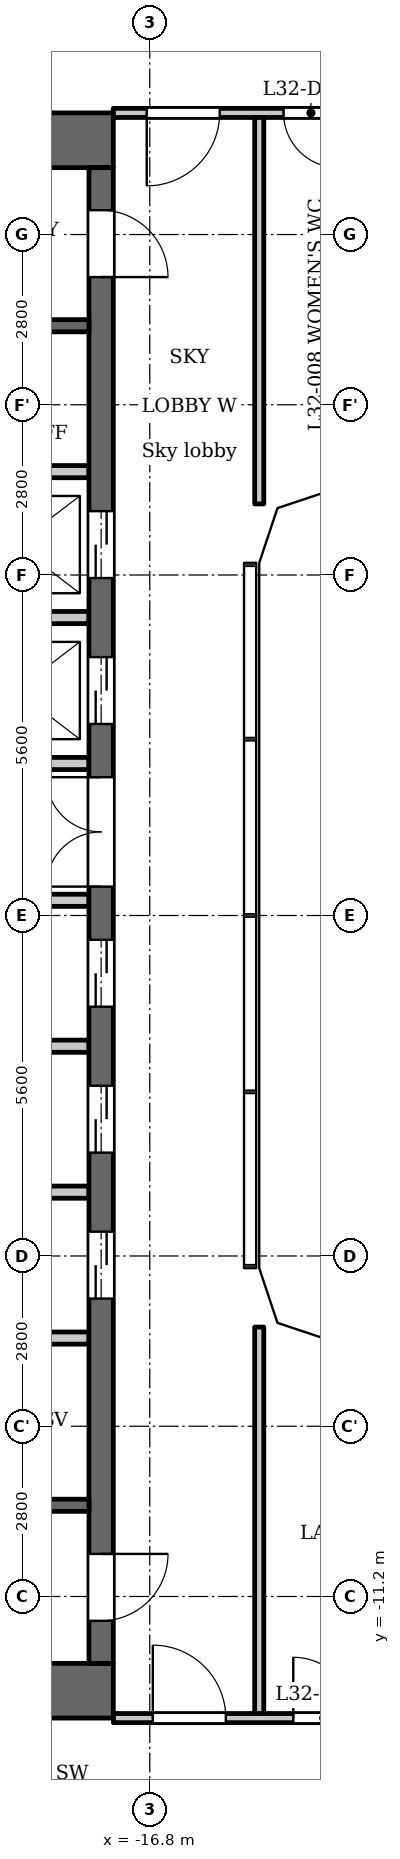
"""IFC4 building model, lengths in metres.
Left out: names, types, materials, properties, quantities, classifications, styles, units other than length and angle.
Written with IfcOpenShell. Run it as: python <this file> out.ifc"""

import sys

from ifc_helpers import new_model, si_unit, direction, frame, frame_2d, origin, place, context, subcontext, project, spatial, polyline, rectangle, outline, extrude, element, fill, save


model = new_model("IFC4")
c1 = context("Model", 3, precision=1e-05, world=origin(), true_north=direction((0.0, 1.0)))
c2 = subcontext(c1, "Body", "Model", "MODEL_VIEW")
j1 = project(units=[si_unit("LENGTHUNIT", "METRE"), si_unit("PLANEANGLEUNIT", "RADIAN")], contexts=[c1])
p1 = place(None, origin())
s1 = spatial("IfcSite", under=j1, at=p1, CompositionType="ELEMENT")
p2 = place(p1, origin())
s2 = spatial("IfcBuilding", under=s1, at=p2, CompositionType="ELEMENT")
p3 = place(p2, frame((0.0, 0.0, 125.3)))
s3 = spatial("IfcBuildingStorey", under=s2, at=p3, CompositionType="ELEMENT", Elevation=125.3)
for number, where, z_axis, x_axis in (
    (1, (-17.4, 12.75, 0.0), (0.0, 0.0, 1.0), (-1.0, 0.0, 0.0)),
    (2, (-17.4, -12.75, 0.0), (0.0, 0.0, 1.0), (-1.0, 0.0, 0.0)),
):
    element("IfcWall", number, at=place(p3, frame(where, z_axis=z_axis, x_axis=x_axis)), inside=s3, PredefinedType="SHEAR", context=c2, shape_type="SweptSolid", body=[
        extrude(rectangle(XDim=10.4, YDim=0.9, at=frame_2d((5.2, 0.0))), origin(), (0.0, 0.0, 1.0), 4.95),
    ])
p4 = place(p3, frame((-17.6, -12.3, 0.0), z_axis=(0.0, 0.0, 1.0), x_axis=(0.0, 1.0, 0.0)))
e3 = element("IfcWall", 3, at=p4, inside=s3, PredefinedType="SHEAR", context=c2, shape_type="SweptSolid", body=[
    extrude(rectangle(XDim=24.6, YDim=0.4, at=frame_2d((12.3, 0.0))), origin(), (0.0, 0.0, 1.0), 4.95),
])
p5 = place(p4, frame((6.0, 0.0, 0.0)))
e4 = element("IfcOpeningElement", 4, at=p5, cuts=e3, PredefinedType="OPENING", context=c2, shape_type="SweptSolid", body=[
    extrude(rectangle(XDim=1.1, YDim=2.1, at=frame_2d((0.55, 1.05))), frame((0.0, 0.21, 0.0), z_axis=(0.0, -1.0, 0.0), x_axis=(1.0, 0.0, 0.0)), (0.0, 0.0, 1.0), 0.42),
])
p6 = place(p4, frame((8.4, 0.0, 0.0)))
e5 = element("IfcOpeningElement", 5, at=p6, cuts=e3, PredefinedType="OPENING", context=c2, shape_type="SweptSolid", body=[
    extrude(rectangle(XDim=1.1, YDim=2.1, at=frame_2d((0.55, 1.05))), frame((0.0, 0.21, 0.0), z_axis=(0.0, -1.0, 0.0), x_axis=(1.0, 0.0, 0.0)), (0.0, 0.0, 1.0), 0.42),
])
p7 = place(p4, frame((10.8, 0.0, 0.0)))
e6 = element("IfcOpeningElement", 6, at=p7, cuts=e3, PredefinedType="OPENING", context=c2, shape_type="SweptSolid", body=[
    extrude(rectangle(XDim=1.1, YDim=2.1, at=frame_2d((0.55, 1.05))), frame((0.0, 0.21, 0.0), z_axis=(0.0, -1.0, 0.0), x_axis=(1.0, 0.0, 0.0)), (0.0, 0.0, 1.0), 0.42),
])
p8 = place(p4, frame((15.45, 0.0, 0.0)))
e7 = element("IfcOpeningElement", 7, at=p8, cuts=e3, PredefinedType="OPENING", context=c2, shape_type="SweptSolid", body=[
    extrude(rectangle(XDim=1.1, YDim=2.1, at=frame_2d((0.55, 1.05))), frame((0.0, 0.21, 0.0), z_axis=(0.0, -1.0, 0.0), x_axis=(1.0, 0.0, 0.0)), (0.0, 0.0, 1.0), 0.42),
])
p9 = place(p4, frame((17.85, 0.0, 0.0)))
e8 = element("IfcOpeningElement", 8, at=p9, cuts=e3, PredefinedType="OPENING", context=c2, shape_type="SweptSolid", body=[
    extrude(rectangle(XDim=1.1, YDim=2.1, at=frame_2d((0.55, 1.05))), frame((0.0, 0.21, 0.0), z_axis=(0.0, -1.0, 0.0), x_axis=(1.0, 0.0, 0.0)), (0.0, 0.0, 1.0), 0.42),
])
p10 = place(p4, frame((22.8, 0.0, 0.0)))
e9 = element("IfcOpeningElement", 9, at=p10, cuts=e3, PredefinedType="OPENING", context=c2, shape_type="SweptSolid", body=[
    extrude(rectangle(XDim=1.1, YDim=2.1, at=frame_2d((0.55, 1.05))), frame((0.0, 0.21, 0.0), z_axis=(0.0, -1.0, 0.0), x_axis=(1.0, 0.0, 0.0)), (0.0, 0.0, 1.0), 0.42),
])
p11 = place(p4, frame((0.7, 0.0, 0.0)))
e10 = element("IfcOpeningElement", 10, at=p11, cuts=e3, PredefinedType="OPENING", context=c2, shape_type="SweptSolid", body=[
    extrude(rectangle(XDim=1.1, YDim=2.1, at=frame_2d((0.55, 1.05))), frame((0.0, 0.21, 0.0), z_axis=(0.0, -1.0, 0.0), x_axis=(1.0, 0.0, 0.0)), (0.0, 0.0, 1.0), 0.42),
])
p12 = place(p4, frame((12.775, 0.0, 0.0)))
e11 = element("IfcOpeningElement", 11, at=p12, cuts=e3, PredefinedType="OPENING", context=c2, shape_type="SweptSolid", body=[
    extrude(rectangle(XDim=1.8, YDim=2.1, at=frame_2d((0.9, 1.05))), frame((0.0, 0.21, 0.0), z_axis=(0.0, -1.0, 0.0), x_axis=(1.0, 0.0, 0.0)), (0.0, 0.0, 1.0), 0.42),
])
p13 = place(p3, frame((-17.8, -9.7, 0.0), z_axis=(0.0, 0.0, 1.0), x_axis=(-1.0, 0.0, 0.0)))
e12 = element("IfcWall", 12, at=p13, inside=s3, PredefinedType="SHEAR", context=c2, shape_type="SweptSolid", body=[
    extrude(rectangle(XDim=8.3, YDim=0.2, at=frame_2d((4.15, 0.0))), origin(), (0.0, 0.0, 1.0), 4.95),
])
p14 = place(p13, frame((0.85, 0.0, 0.0)))
e13 = element("IfcOpeningElement", 13, at=p14, cuts=e12, PredefinedType="OPENING", context=c2, shape_type="SweptSolid", body=[
    extrude(rectangle(XDim=1.1, YDim=2.1, at=frame_2d((0.55, 1.05))), frame((0.0, 0.11, 0.0), z_axis=(0.0, -1.0, 0.0), x_axis=(1.0, 0.0, 0.0)), (0.0, 0.0, 1.0), 0.22),
])
p15 = place(p13, frame((3.75, 0.0, 0.0)))
e14 = element("IfcOpeningElement", 14, at=p15, cuts=e12, PredefinedType="OPENING", context=c2, shape_type="SweptSolid", body=[
    extrude(rectangle(XDim=1.1, YDim=2.1, at=frame_2d((0.55, 1.05))), frame((0.0, 0.11, 0.0), z_axis=(0.0, -1.0, 0.0), x_axis=(1.0, 0.0, 0.0)), (0.0, 0.0, 1.0), 0.22),
])
for number, where, z_axis, x_axis in (
    (15, (-17.8, -6.95, 0.0), (0.0, 0.0, 1.0), (-1.0, 0.0, 0.0)),
    (16, (-17.8, -4.55, 0.0), (0.0, 0.0, 1.0), (-1.0, 0.0, 0.0)),
    (17, (-17.8, -2.15, 0.0), (0.0, 0.0, 1.0), (-1.0, 0.0, 0.0)),
):
    element("IfcWall", number, at=place(p3, frame(where, z_axis=z_axis, x_axis=x_axis)), inside=s3, PredefinedType="PARTITIONING", context=c2, shape_type="SweptSolid", body=[
        extrude(rectangle(XDim=2.8, YDim=0.2, at=frame_2d((1.4, 0.0))), origin(), (0.0, 0.0, 1.0), 4.95),
    ])
for number, where, z_axis, x_axis in (
    (18, (-17.8, 0.25, 0.0), (0.0, 0.0, 1.0), (-1.0, 0.0, 0.0)),
    (19, (-17.8, 2.5, 0.0), (0.0, 0.0, 1.0), (-1.0, 0.0, 0.0)),
):
    element("IfcWall", number, at=place(p3, frame(where, z_axis=z_axis, x_axis=x_axis)), inside=s3, PredefinedType="PARTITIONING", context=c2, shape_type="SweptSolid", body=[
        extrude(rectangle(XDim=3.0, YDim=0.2, at=frame_2d((1.5, 0.0))), origin(), (0.0, 0.0, 1.0), 4.95),
    ])
for number, where, z_axis, x_axis in (
    (20, (-17.8, 4.9, 0.0), (0.0, 0.0, 1.0), (-1.0, 0.0, 0.0)),
    (21, (-17.8, 7.3, 0.0), (0.0, 0.0, 1.0), (-1.0, 0.0, 0.0)),
):
    element("IfcWall", number, at=place(p3, frame(where, z_axis=z_axis, x_axis=x_axis)), inside=s3, PredefinedType="PARTITIONING", context=c2, shape_type="SweptSolid", body=[
        extrude(rectangle(XDim=2.8, YDim=0.2, at=frame_2d((1.4, 0.0))), origin(), (0.0, 0.0, 1.0), 4.95),
    ])
p16 = place(p3, frame((-17.8, 9.7, 0.0), z_axis=(0.0, 0.0, 1.0), x_axis=(-1.0, 0.0, 0.0)))
e22 = element("IfcWall", 22, at=p16, inside=s3, PredefinedType="SHEAR", context=c2, shape_type="SweptSolid", body=[
    extrude(rectangle(XDim=8.3, YDim=0.2, at=frame_2d((4.15, 0.0))), origin(), (0.0, 0.0, 1.0), 4.95),
])
p17 = place(p16, frame((0.85, 0.0, 0.0)))
e23 = element("IfcOpeningElement", 23, at=p17, cuts=e22, PredefinedType="OPENING", context=c2, shape_type="SweptSolid", body=[
    extrude(rectangle(XDim=1.1, YDim=2.1, at=frame_2d((0.55, 1.05))), frame((0.0, 0.11, 0.0), z_axis=(0.0, -1.0, 0.0), x_axis=(1.0, 0.0, 0.0)), (0.0, 0.0, 1.0), 0.22),
])
p18 = place(p16, frame((3.75, 0.0, 0.0)))
e24 = element("IfcOpeningElement", 24, at=p18, cuts=e22, PredefinedType="OPENING", context=c2, shape_type="SweptSolid", body=[
    extrude(rectangle(XDim=1.1, YDim=2.1, at=frame_2d((0.55, 1.05))), frame((0.0, 0.11, 0.0), z_axis=(0.0, -1.0, 0.0), x_axis=(1.0, 0.0, 0.0)), (0.0, 0.0, 1.0), 0.22),
])
p19 = place(p3, frame((-17.4, -13.2, 0.0), z_axis=(0.0, 0.0, 1.0), x_axis=(1.0, 0.0, 0.0)))
e25 = element("IfcWall", 25, at=p19, inside=s3, PredefinedType="PARTITIONING", context=c2, shape_type="SweptSolid", body=[
    extrude(rectangle(XDim=6.016, YDim=0.15, at=frame_2d((3.008, 0.0))), origin(), (0.0, 0.0, 1.0), 4.95),
])
p20 = place(p19, frame((0.65, 0.0, 0.0)))
e26 = element("IfcOpeningElement", 26, at=p20, cuts=e25, PredefinedType="OPENING", context=c2, shape_type="SweptSolid", body=[
    extrude(rectangle(XDim=1.2, YDim=2.1, at=frame_2d((0.6, 1.05))), frame((0.0, 0.085, 0.0), z_axis=(0.0, -1.0, 0.0), x_axis=(1.0, 0.0, 0.0)), (0.0, 0.0, 1.0), 0.17),
])
p21 = place(p19, frame((2.96, 0.0, 0.0)))
e27 = element("IfcOpeningElement", 27, at=p21, cuts=e25, PredefinedType="OPENING", context=c2, shape_type="SweptSolid", body=[
    extrude(rectangle(XDim=1.0, YDim=2.1, at=frame_2d((0.5, 1.05))), frame((0.0, 0.085, 0.0), z_axis=(0.0, -1.0, 0.0), x_axis=(1.0, 0.0, 0.0)), (0.0, 0.0, 1.0), 0.17),
])
p22 = place(p3, frame((-17.4, 13.2, 0.0), z_axis=(0.0, 0.0, 1.0), x_axis=(1.0, 0.0, 0.0)))
e28 = element("IfcWall", 28, at=p22, inside=s3, PredefinedType="PARTITIONING", context=c2, shape_type="SweptSolid", body=[
    extrude(rectangle(XDim=6.016, YDim=0.15, at=frame_2d((3.008, 0.0))), origin(), (0.0, 0.0, 1.0), 4.95),
])
p23 = place(p22, frame((0.55, 0.0, 0.0)))
e29 = element("IfcOpeningElement", 29, at=p23, cuts=e28, PredefinedType="OPENING", context=c2, shape_type="SweptSolid", body=[
    extrude(rectangle(XDim=1.2, YDim=2.1, at=frame_2d((0.6, 1.05))), frame((0.0, 0.085, 0.0), z_axis=(0.0, -1.0, 0.0), x_axis=(1.0, 0.0, 0.0)), (0.0, 0.0, 1.0), 0.17),
])
p24 = place(p22, frame((4.7, 0.0, 0.0)))
e30 = element("IfcOpeningElement", 30, at=p24, cuts=e28, PredefinedType="OPENING", context=c2, shape_type="SweptSolid", body=[
    extrude(rectangle(XDim=0.9, YDim=2.1, at=frame_2d((0.45, 1.05))), frame((0.0, 0.085, 0.0), z_axis=(0.0, -1.0, 0.0), x_axis=(1.0, 0.0, 0.0)), (0.0, 0.0, 1.0), 0.17),
])
p25 = place(p22, frame((2.8, 0.0, 0.0)))
e31 = element("IfcOpeningElement", 31, at=p25, cuts=e28, PredefinedType="OPENING", context=c2, shape_type="SweptSolid", body=[
    extrude(rectangle(XDim=0.9, YDim=2.1, at=frame_2d((0.45, 1.05))), frame((0.0, 0.085, 0.0), z_axis=(0.0, -1.0, 0.0), x_axis=(1.0, 0.0, 0.0)), (0.0, 0.0, 1.0), 0.17),
])
for number, where, z_axis, x_axis in (
    (32, (-15.0, -13.125, 0.0), (0.0, 0.0, 1.0), (0.0, 1.0, 0.0)),
    (33, (-15.0, 6.769, 0.0), (0.0, 0.0, 1.0), (0.0, 1.0, 0.0)),
):
    element("IfcWall", number, at=place(p3, frame(where, z_axis=z_axis, x_axis=x_axis)), inside=s3, PredefinedType="PARTITIONING", context=c2, shape_type="SweptSolid", body=[
        extrude(rectangle(XDim=6.356, YDim=0.15, at=frame_2d((3.178, 0.0))), origin(), (0.0, 0.0, 1.0), 4.95),
    ])
p26 = place(p3, origin())
e34 = element("IfcWall", 34, at=p26, inside=s3, PredefinedType="SOLIDWALL", context=c2, shape_type="SweptSolid", body=[
    extrude(outline(polyline([(-15.0, 5.8), (-14.7, 6.7), (-13.8, 7.0), (-13.8, 7.3), (-13.849, 7.3), (-14.937, 6.937), (-15.3, 5.849), (-15.3, 5.8), (-15.0, 5.8)])), origin(), (0.0, 0.0, 1.0), 4.95),
])
e35 = element("IfcWall", 35, at=p26, inside=s3, PredefinedType="SOLIDWALL", context=c2, shape_type="SweptSolid", body=[
    extrude(outline(polyline([(-13.8, -7.0), (-14.7, -6.7), (-15.0, -5.8), (-15.3, -5.8), (-15.3, -5.849), (-14.937, -6.937), (-13.849, -7.3), (-13.8, -7.3), (-13.8, -7.0)])), origin(), (0.0, 0.0, 1.0), 4.95),
])
p27 = place(p5, origin())
e36 = element("IfcDoor", 36, at=p27, inside=s3, OperationType="DOUBLE_DOOR_SLIDING", PredefinedType="DOOR", context=c2, shape_type="SweptSolid", body=[
    extrude(rectangle(XDim=1.1, YDim=2.1, at=frame_2d((0.55, 1.05))), frame((0.0, 0.025, 0.0), z_axis=(0.0, -1.0, 0.0), x_axis=(1.0, 0.0, 0.0)), (0.0, 0.0, 1.0), 0.05),
])
fill(e4, e36)
p28 = place(p6, origin())
e37 = element("IfcDoor", 37, at=p28, inside=s3, OperationType="DOUBLE_DOOR_SLIDING", PredefinedType="DOOR", context=c2, shape_type="SweptSolid", body=[
    extrude(rectangle(XDim=1.1, YDim=2.1, at=frame_2d((0.55, 1.05))), frame((0.0, 0.025, 0.0), z_axis=(0.0, -1.0, 0.0), x_axis=(1.0, 0.0, 0.0)), (0.0, 0.0, 1.0), 0.05),
])
fill(e5, e37)
p29 = place(p7, origin())
e38 = element("IfcDoor", 38, at=p29, inside=s3, OperationType="DOUBLE_DOOR_SLIDING", PredefinedType="DOOR", context=c2, shape_type="SweptSolid", body=[
    extrude(rectangle(XDim=1.1, YDim=2.1, at=frame_2d((0.55, 1.05))), frame((0.0, 0.025, 0.0), z_axis=(0.0, -1.0, 0.0), x_axis=(1.0, 0.0, 0.0)), (0.0, 0.0, 1.0), 0.05),
])
fill(e6, e38)
p30 = place(p8, origin())
e39 = element("IfcDoor", 39, at=p30, inside=s3, OperationType="DOUBLE_DOOR_SLIDING", PredefinedType="DOOR", context=c2, shape_type="SweptSolid", body=[
    extrude(rectangle(XDim=1.1, YDim=2.1, at=frame_2d((0.55, 1.05))), frame((0.0, 0.025, 0.0), z_axis=(0.0, -1.0, 0.0), x_axis=(1.0, 0.0, 0.0)), (0.0, 0.0, 1.0), 0.05),
])
fill(e7, e39)
p31 = place(p9, origin())
e40 = element("IfcDoor", 40, at=p31, inside=s3, OperationType="DOUBLE_DOOR_SLIDING", PredefinedType="DOOR", context=c2, shape_type="SweptSolid", body=[
    extrude(rectangle(XDim=1.1, YDim=2.1, at=frame_2d((0.55, 1.05))), frame((0.0, 0.025, 0.0), z_axis=(0.0, -1.0, 0.0), x_axis=(1.0, 0.0, 0.0)), (0.0, 0.0, 1.0), 0.05),
])
fill(e8, e40)
p32 = place(p10, origin())
e41 = element("IfcDoor", 41, at=p32, inside=s3, OperationType="SINGLE_SWING_LEFT", PredefinedType="DOOR", context=c2, shape_type="SweptSolid", body=[
    extrude(rectangle(XDim=1.1, YDim=2.1, at=frame_2d((0.55, 1.05))), frame((0.0, 0.025, 0.0), z_axis=(0.0, -1.0, 0.0), x_axis=(1.0, 0.0, 0.0)), (0.0, 0.0, 1.0), 0.05),
])
fill(e9, e41)
p33 = place(p11, origin())
e42 = element("IfcDoor", 42, at=p33, inside=s3, OperationType="SINGLE_SWING_RIGHT", PredefinedType="DOOR", context=c2, shape_type="SweptSolid", body=[
    extrude(rectangle(XDim=1.1, YDim=2.1, at=frame_2d((0.55, 1.05))), frame((0.0, 0.025, 0.0), z_axis=(0.0, -1.0, 0.0), x_axis=(1.0, 0.0, 0.0)), (0.0, 0.0, 1.0), 0.05),
])
fill(e10, e42)
p34 = place(p12, origin())
e43 = element("IfcDoor", 43, at=p34, inside=s3, OperationType="DOUBLE_DOOR_SINGLE_SWING", PredefinedType="DOOR", context=c2, shape_type="SweptSolid", body=[
    extrude(rectangle(XDim=1.8, YDim=2.1, at=frame_2d((0.9, 1.05))), frame((0.0, 0.025, 0.0), z_axis=(0.0, -1.0, 0.0), x_axis=(1.0, 0.0, 0.0)), (0.0, 0.0, 1.0), 0.05),
])
fill(e11, e43)
p35 = place(p23, origin())
e44 = element("IfcDoor", 44, at=p35, inside=s3, OperationType="SINGLE_SWING_LEFT", PredefinedType="DOOR", context=c2, shape_type="SweptSolid", body=[
    extrude(rectangle(XDim=1.2, YDim=2.1, at=frame_2d((0.6, 1.05))), frame((0.0, 0.025, 0.0), z_axis=(0.0, -1.0, 0.0), x_axis=(1.0, 0.0, 0.0)), (0.0, 0.0, 1.0), 0.05),
])
fill(e29, e44)
p36 = place(p25, origin())
e45 = element("IfcDoor", 45, at=p36, inside=s3, OperationType="SINGLE_SWING_RIGHT", PredefinedType="DOOR", context=c2, shape_type="SweptSolid", body=[
    extrude(rectangle(XDim=0.9, YDim=2.1, at=frame_2d((0.45, 1.05))), frame((0.0, 0.025, 0.0), z_axis=(0.0, -1.0, 0.0), x_axis=(1.0, 0.0, 0.0)), (0.0, 0.0, 1.0), 0.05),
])
fill(e31, e45)
p37 = place(p20, origin())
e46 = element("IfcDoor", 46, at=p37, inside=s3, OperationType="SINGLE_SWING_RIGHT", PredefinedType="DOOR", context=c2, shape_type="SweptSolid", body=[
    extrude(rectangle(XDim=1.2, YDim=2.1, at=frame_2d((0.6, 1.05))), frame((0.0, 0.025, 0.0), z_axis=(0.0, -1.0, 0.0), x_axis=(1.0, 0.0, 0.0)), (0.0, 0.0, 1.0), 0.05),
])
fill(e26, e46)
p38 = place(p21, origin())
e47 = element("IfcDoor", 47, at=p38, inside=s3, OperationType="SINGLE_SWING_RIGHT", PredefinedType="DOOR", context=c2, shape_type="SweptSolid", body=[
    extrude(rectangle(XDim=1.0, YDim=2.1, at=frame_2d((0.5, 1.05))), frame((0.0, 0.025, 0.0), z_axis=(0.0, -1.0, 0.0), x_axis=(1.0, 0.0, 0.0)), (0.0, 0.0, 1.0), 0.05),
])
fill(e27, e47)
save(model, sys.argv[1])
